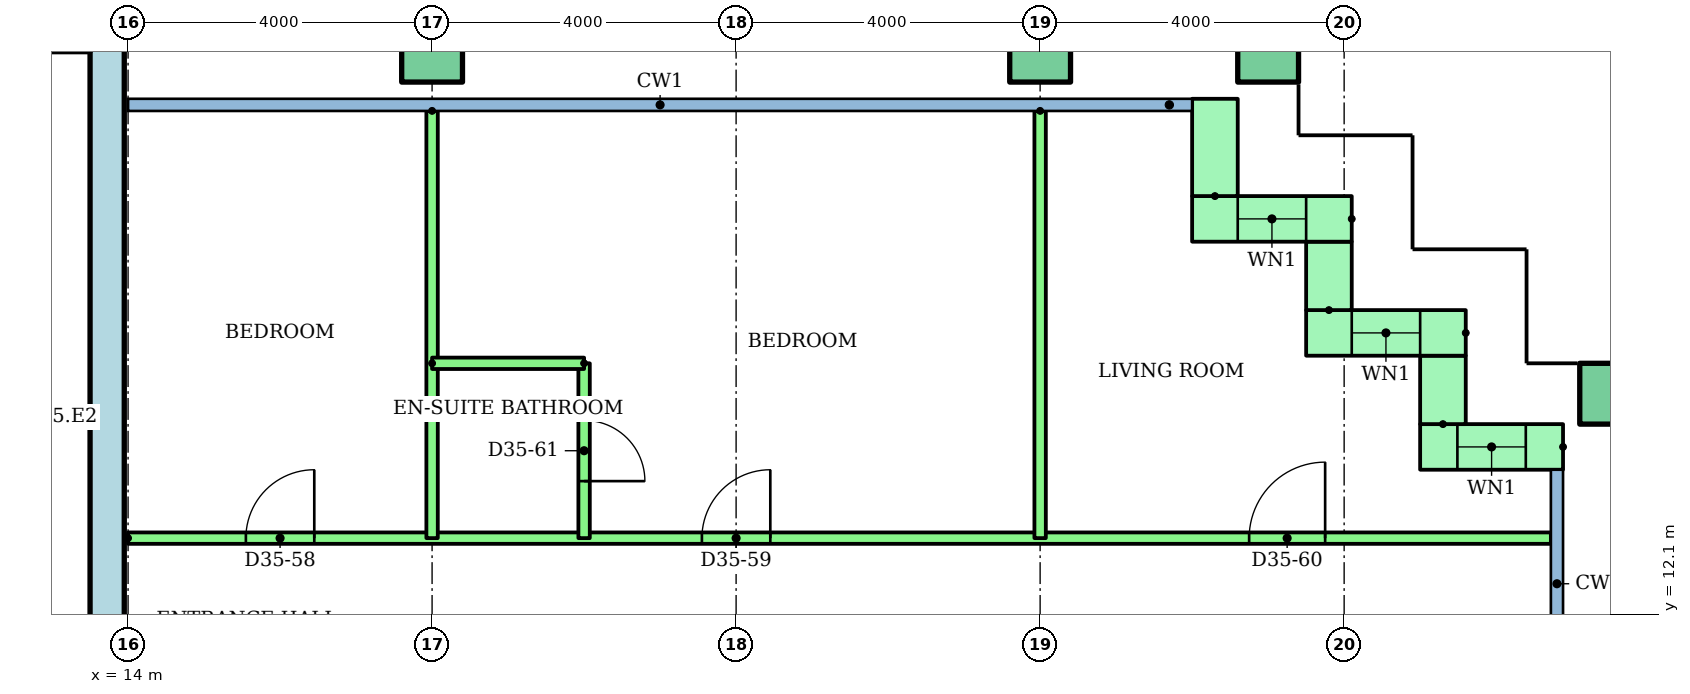
"""IFC4 building model, lengths in metres.
Left out: names, types, materials, properties, quantities, classifications, styles, units other than length and angle.
Written with IfcOpenShell. Run it as: python <this file> out.ifc"""

import sys

from ifc_helpers import new_model, si_unit, direction, frame, frame_2d, origin, origin_2d, place, context, subcontext, project, spatial, rectangle, hollow_rectangle, extrude, element, fill, save


model = new_model("IFC4")
c1 = context("Model", 3, precision=1e-05, world=origin(), true_north=direction((0.0, 1.0)))
c2 = subcontext(c1, "Body", "Model", "MODEL_VIEW")
j1 = project(units=[si_unit("LENGTHUNIT", "METRE"), si_unit("PLANEANGLEUNIT", "RADIAN")], contexts=[c1])
p1 = place(None, origin())
s1 = spatial("IfcSite", under=j1, at=p1, CompositionType="ELEMENT")
p2 = place(p1, origin())
s2 = spatial("IfcBuilding", under=s1, at=p2, CompositionType="ELEMENT")
p3 = place(p2, frame((0.0, 0.0, 135.8)))
s3 = spatial("IfcBuildingStorey", under=s2, at=p3, CompositionType="ELEMENT", Elevation=135.8)
for number, where in (
    (1, (33.5, 15.0, 0.0)),
    (2, (18.0, 19.5, 0.0)),
    (3, (26.0, 19.5, 0.0)),
    (4, (29.0, 19.5, 0.0)),
):
    element("IfcColumn", number, at=place(p3, frame(where)), inside=s3, PredefinedType="COLUMN", context=c2, shape_type="SweptSolid", body=[
        extrude(hollow_rectangle(XDim=0.8, YDim=0.8, WallThickness=0.04, at=origin_2d()), origin(), (0.0, 0.0, 1.0), 3.2),
    ])
p4 = place(p3, frame((32.88, 14.3, 0.0), z_axis=(0.0, 0.0, 1.0), x_axis=(-1.0, 0.0, 0.0)))
e5 = element("IfcWall", 5, at=p4, inside=s3, PredefinedType="STANDARD", context=c2, shape_type="SweptSolid", body=[
    extrude(rectangle(XDim=1.88, YDim=0.6, at=frame_2d((0.94, 0.0))), origin(), (0.0, 0.0, 1.0), 2.92),
])
p5 = place(p4, frame((0.49, 0.0, 0.9)))
e6 = element("IfcOpeningElement", 6, at=p5, cuts=e5, PredefinedType="OPENING", context=c2, shape_type="SweptSolid", body=[
    extrude(rectangle(XDim=0.9, YDim=1.5, at=frame_2d((0.45, 0.75))), frame((0.0, 0.31, 0.0), z_axis=(0.0, -1.0, 0.0), x_axis=(1.0, 0.0, 0.0)), (0.0, 0.0, 1.0), 0.62),
])
p6 = place(p3, frame((31.3, 14.6, 0.0), z_axis=(0.0, 0.0, 1.0), x_axis=(0.0, 1.0, 0.0)))
e7 = element("IfcWall", 7, at=p6, inside=s3, PredefinedType="STANDARD", context=c2, shape_type="SweptSolid", body=[
    extrude(rectangle(XDim=0.9, YDim=0.6, at=frame_2d((0.45, 0.0))), origin(), (0.0, 0.0, 1.0), 2.92),
])
p7 = place(p3, frame((31.6, 15.8, 0.0), z_axis=(0.0, 0.0, 1.0), x_axis=(-1.0, 0.0, 0.0)))
e8 = element("IfcWall", 8, at=p7, inside=s3, PredefinedType="STANDARD", context=c2, shape_type="SweptSolid", body=[
    extrude(rectangle(XDim=2.1, YDim=0.6, at=frame_2d((1.05, 0.0))), origin(), (0.0, 0.0, 1.0), 2.92),
])
p8 = place(p7, frame((0.6, 0.0, 0.9)))
e9 = element("IfcOpeningElement", 9, at=p8, cuts=e8, PredefinedType="OPENING", context=c2, shape_type="SweptSolid", body=[
    extrude(rectangle(XDim=0.9, YDim=1.5, at=frame_2d((0.45, 0.75))), frame((0.0, 0.31, 0.0), z_axis=(0.0, -1.0, 0.0), x_axis=(1.0, 0.0, 0.0)), (0.0, 0.0, 1.0), 0.62),
])
p9 = place(p3, frame((29.8, 16.1, 0.0), z_axis=(0.0, 0.0, 1.0), x_axis=(0.0, 1.0, 0.0)))
e10 = element("IfcWall", 10, at=p9, inside=s3, PredefinedType="STANDARD", context=c2, shape_type="SweptSolid", body=[
    extrude(rectangle(XDim=0.9, YDim=0.6, at=frame_2d((0.45, 0.0))), origin(), (0.0, 0.0, 1.0), 2.92),
])
p10 = place(p3, frame((30.1, 17.3, 0.0), z_axis=(0.0, 0.0, 1.0), x_axis=(-1.0, 0.0, 0.0)))
e11 = element("IfcWall", 11, at=p10, inside=s3, PredefinedType="STANDARD", context=c2, shape_type="SweptSolid", body=[
    extrude(rectangle(XDim=2.1, YDim=0.6, at=frame_2d((1.05, 0.0))), origin(), (0.0, 0.0, 1.0), 2.92),
])
p11 = place(p10, frame((0.6, 0.0, 0.9)))
e12 = element("IfcOpeningElement", 12, at=p11, cuts=e11, PredefinedType="OPENING", context=c2, shape_type="SweptSolid", body=[
    extrude(rectangle(XDim=0.9, YDim=1.5, at=frame_2d((0.45, 0.75))), frame((0.0, 0.31, 0.0), z_axis=(0.0, -1.0, 0.0), x_axis=(1.0, 0.0, 0.0)), (0.0, 0.0, 1.0), 0.62),
])
p12 = place(p3, frame((28.3, 17.6, 0.0), z_axis=(0.0, 0.0, 1.0), x_axis=(0.0, 1.0, 0.0)))
e13 = element("IfcWall", 13, at=p12, inside=s3, PredefinedType="STANDARD", context=c2, shape_type="SweptSolid", body=[
    extrude(rectangle(XDim=1.28, YDim=0.6, at=frame_2d((0.64, 0.0))), origin(), (0.0, 0.0, 1.0), 2.92),
])
p13 = place(p3, frame((13.725, 3.0, 0.0), z_axis=(0.0, 0.0, 1.0), x_axis=(0.0, 1.0, 0.0)))
e14 = element("IfcWall", 14, at=p13, inside=s3, PredefinedType="SHEAR", context=c2, shape_type="SweptSolid", body=[
    extrude(rectangle(XDim=17.0, YDim=0.45, at=frame_2d((8.5, 0.0))), origin(), (0.0, 0.0, 1.0), 2.92),
])
p14 = place(p3, frame((14.0, 13.1, 0.0)))
e15 = element("IfcWall", 15, at=p14, inside=s3, PredefinedType="PARTITIONING", context=c2, shape_type="SweptSolid", body=[
    extrude(rectangle(XDim=18.72, YDim=0.15, at=frame_2d((9.36, 0.0))), origin(), (0.0, 0.0, 1.0), 2.4),
])
p15 = place(p14, frame((1.55, 0.0, 0.0)))
e16 = element("IfcOpeningElement", 16, at=p15, cuts=e15, PredefinedType="OPENING", context=c2, shape_type="SweptSolid", body=[
    extrude(rectangle(XDim=0.9, YDim=2.1, at=frame_2d((0.45, 1.05))), frame((0.0, 0.085, 0.0), z_axis=(0.0, -1.0, 0.0), x_axis=(1.0, 0.0, 0.0)), (0.0, 0.0, 1.0), 0.17),
])
p16 = place(p14, frame((7.55, 0.0, 0.0)))
e17 = element("IfcOpeningElement", 17, at=p16, cuts=e15, PredefinedType="OPENING", context=c2, shape_type="SweptSolid", body=[
    extrude(rectangle(XDim=0.9, YDim=2.1, at=frame_2d((0.45, 1.05))), frame((0.0, 0.085, 0.0), z_axis=(0.0, -1.0, 0.0), x_axis=(1.0, 0.0, 0.0)), (0.0, 0.0, 1.0), 0.17),
])
p17 = place(p14, frame((14.75, 0.0, 0.0)))
e18 = element("IfcOpeningElement", 18, at=p17, cuts=e15, PredefinedType="OPENING", context=c2, shape_type="SweptSolid", body=[
    extrude(rectangle(XDim=1.0, YDim=2.1, at=frame_2d((0.5, 1.05))), frame((0.0, 0.085, 0.0), z_axis=(0.0, -1.0, 0.0), x_axis=(1.0, 0.0, 0.0)), (0.0, 0.0, 1.0), 0.17),
])
for number, where, z_axis, x_axis in (
    (19, (18.0, 18.721, 0.0), (0.0, 0.0, 1.0), (0.0, -1.0, 0.0)),
    (20, (26.0, 18.721, 0.0), (0.0, 0.0, 1.0), (0.0, -1.0, 0.0)),
):
    element("IfcWall", number, at=place(p3, frame(where, z_axis=z_axis, x_axis=x_axis)), inside=s3, PredefinedType="PARTITIONING", context=c2, shape_type="SweptSolid", body=[
        extrude(rectangle(XDim=5.621, YDim=0.15, at=frame_2d((2.811, 0.0))), origin(), (0.0, 0.0, 1.0), 2.4),
    ])
p18 = place(p3, frame((20.0, 15.4, 0.0), z_axis=(0.0, 0.0, 1.0), x_axis=(0.0, -1.0, 0.0)))
e21 = element("IfcWall", 21, at=p18, inside=s3, PredefinedType="PARTITIONING", context=c2, shape_type="SweptSolid", body=[
    extrude(rectangle(XDim=2.3, YDim=0.15, at=frame_2d((1.15, 0.0))), origin(), (0.0, 0.0, 1.0), 2.4),
])
p19 = place(p18, frame((0.75, 0.0, 0.0)))
e22 = element("IfcOpeningElement", 22, at=p19, cuts=e21, PredefinedType="OPENING", context=c2, shape_type="SweptSolid", body=[
    extrude(rectangle(XDim=0.8, YDim=2.1, at=frame_2d((0.4, 1.05))), frame((0.0, 0.085, 0.0), z_axis=(0.0, -1.0, 0.0), x_axis=(1.0, 0.0, 0.0)), (0.0, 0.0, 1.0), 0.17),
])
p20 = place(p3, frame((18.0, 15.4, 0.0)))
e23 = element("IfcWall", 23, at=p20, inside=s3, PredefinedType="PARTITIONING", context=c2, shape_type="SweptSolid", body=[
    extrude(rectangle(XDim=2.0, YDim=0.15, at=frame_2d((1.0, 0.0))), origin(), (0.0, 0.0, 1.0), 2.4),
])
p21 = place(p5, origin())
e24 = element("IfcWindow", 24, at=p21, inside=s3, PartitioningType="SINGLE_PANEL", PredefinedType="WINDOW", context=c2, shape_type="SweptSolid", body=[
    extrude(rectangle(XDim=0.9, YDim=1.5, at=frame_2d((0.45, 0.75))), frame((0.0, 0.03, 0.0), z_axis=(0.0, -1.0, 0.0), x_axis=(1.0, 0.0, 0.0)), (0.0, 0.0, 1.0), 0.06),
])
fill(e6, e24)
p22 = place(p8, origin())
e25 = element("IfcWindow", 25, at=p22, inside=s3, PartitioningType="SINGLE_PANEL", PredefinedType="WINDOW", context=c2, shape_type="SweptSolid", body=[
    extrude(rectangle(XDim=0.9, YDim=1.5, at=frame_2d((0.45, 0.75))), frame((0.0, 0.03, 0.0), z_axis=(0.0, -1.0, 0.0), x_axis=(1.0, 0.0, 0.0)), (0.0, 0.0, 1.0), 0.06),
])
fill(e9, e25)
p23 = place(p11, origin())
e26 = element("IfcWindow", 26, at=p23, inside=s3, PartitioningType="SINGLE_PANEL", PredefinedType="WINDOW", context=c2, shape_type="SweptSolid", body=[
    extrude(rectangle(XDim=0.9, YDim=1.5, at=frame_2d((0.45, 0.75))), frame((0.0, 0.03, 0.0), z_axis=(0.0, -1.0, 0.0), x_axis=(1.0, 0.0, 0.0)), (0.0, 0.0, 1.0), 0.06),
])
fill(e12, e26)
p24 = place(p15, origin())
e27 = element("IfcDoor", 27, at=p24, inside=s3, OperationType="SINGLE_SWING_RIGHT", PredefinedType="DOOR", context=c2, shape_type="SweptSolid", body=[
    extrude(rectangle(XDim=0.9, YDim=2.1, at=frame_2d((0.45, 1.05))), frame((0.0, 0.025, 0.0), z_axis=(0.0, -1.0, 0.0), x_axis=(1.0, 0.0, 0.0)), (0.0, 0.0, 1.0), 0.05),
])
fill(e16, e27)
p25 = place(p16, origin())
e28 = element("IfcDoor", 28, at=p25, inside=s3, OperationType="SINGLE_SWING_RIGHT", PredefinedType="DOOR", context=c2, shape_type="SweptSolid", body=[
    extrude(rectangle(XDim=0.9, YDim=2.1, at=frame_2d((0.45, 1.05))), frame((0.0, 0.025, 0.0), z_axis=(0.0, -1.0, 0.0), x_axis=(1.0, 0.0, 0.0)), (0.0, 0.0, 1.0), 0.05),
])
fill(e17, e28)
p26 = place(p17, origin())
e29 = element("IfcDoor", 29, at=p26, inside=s3, OperationType="SINGLE_SWING_RIGHT", PredefinedType="DOOR", context=c2, shape_type="SweptSolid", body=[
    extrude(rectangle(XDim=1.0, YDim=2.1, at=frame_2d((0.5, 1.05))), frame((0.0, 0.025, 0.0), z_axis=(0.0, -1.0, 0.0), x_axis=(1.0, 0.0, 0.0)), (0.0, 0.0, 1.0), 0.05),
])
fill(e18, e29)
p27 = place(p19, origin())
e30 = element("IfcDoor", 30, at=p27, inside=s3, OperationType="SINGLE_SWING_RIGHT", PredefinedType="DOOR", context=c2, shape_type="SweptSolid", body=[
    extrude(rectangle(XDim=0.8, YDim=2.1, at=frame_2d((0.4, 1.05))), frame((0.0, 0.025, 0.0), z_axis=(0.0, -1.0, 0.0), x_axis=(1.0, 0.0, 0.0)), (0.0, 0.0, 1.0), 0.05),
])
fill(e22, e30)
save(model, sys.argv[1])
